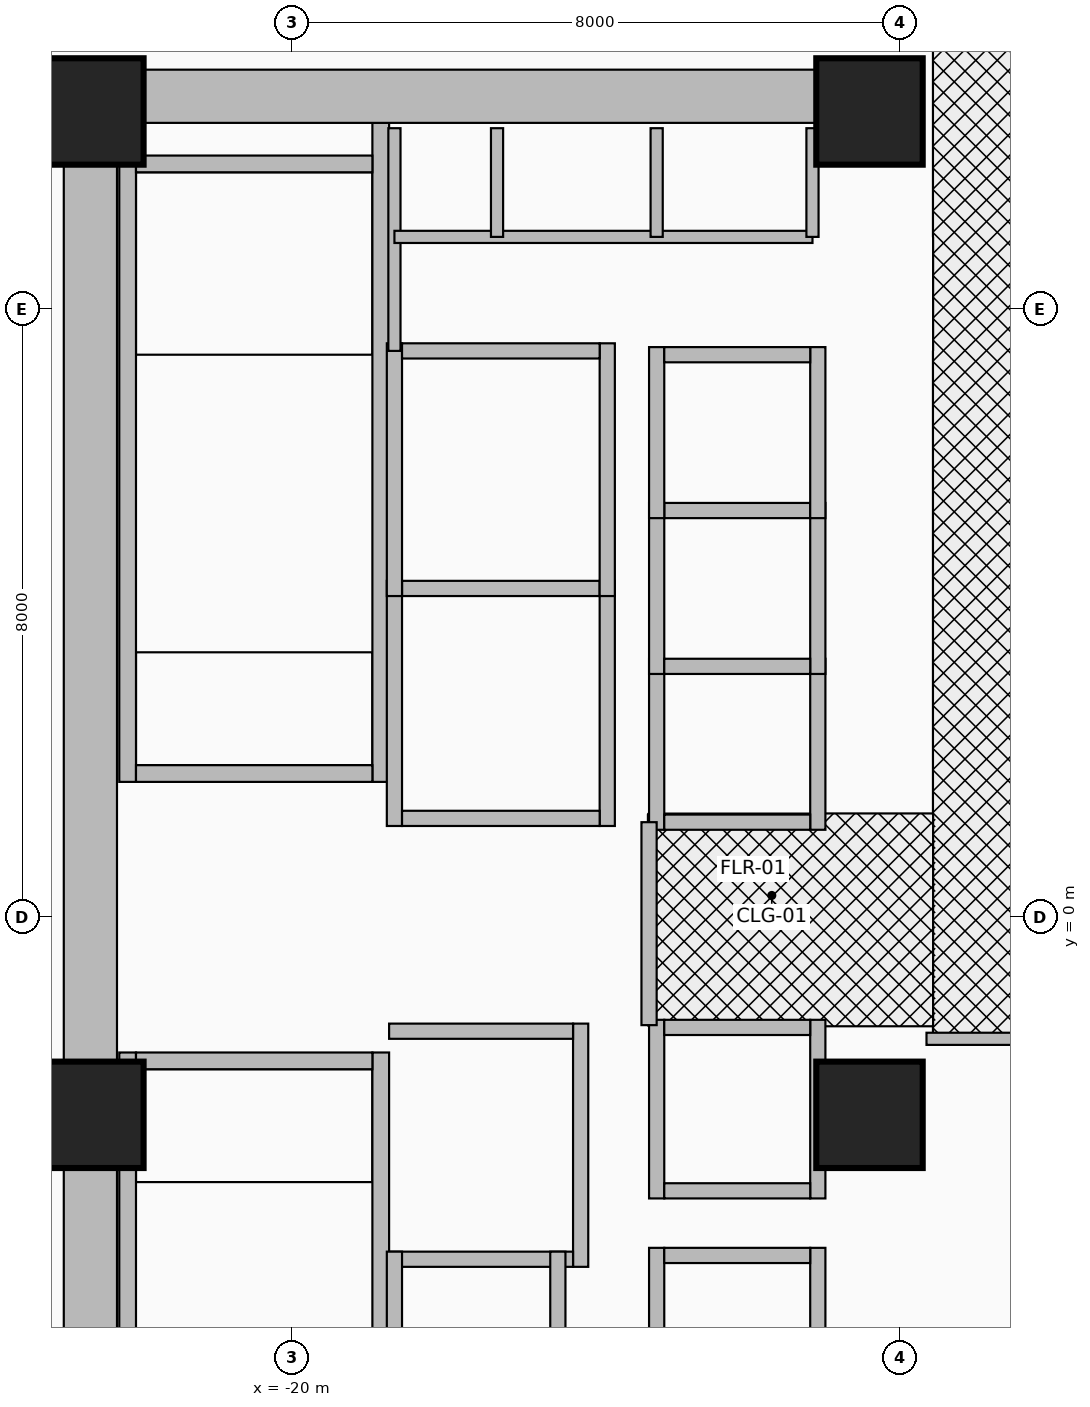
"""IFC4 building model, lengths in metres.
Left out: names, types, materials, properties, quantities, classifications, styles, units other than length and angle.
Written with IfcOpenShell. Run it as: python <this file> out.ifc"""

import sys

from ifc_helpers import new_model, si_unit, direction, frame, frame_2d, origin, origin_2d, place, context, subcontext, project, spatial, rectangle, extrude, source, transform, mapped, element, fill, save


model = new_model("IFC4")
c1 = context("Model", 3, precision=1e-05, world=origin(), true_north=direction((0.0, 1.0)))
c2 = subcontext(c1, "Body", "Model", "MODEL_VIEW")
j1 = project(units=[si_unit("LENGTHUNIT", "METRE"), si_unit("PLANEANGLEUNIT", "RADIAN")], contexts=[c1])
p1 = place(None, origin())
s1 = spatial("IfcSite", under=j1, at=p1, CompositionType="ELEMENT")
p2 = place(p1, origin())
s2 = spatial("IfcBuilding", under=s1, at=p2, CompositionType="ELEMENT")
p3 = place(p2, frame((0.0, 0.0, 5.2)))
s3 = spatial("IfcBuildingStorey", under=s2, at=p3, CompositionType="ELEMENT", Elevation=5.2)
for number, where, z_axis, x_axis in (
    (1, (-22.16, 1.78, 0.0), (0.0, 0.0, 1.0), (0.0, 1.0, 0.0)),
    (2, (-18.83, 1.78, 0.0), (0.0, 0.0, 1.0), (0.0, 1.0, 0.0)),
):
    element("IfcWall", number, at=place(p3, frame(where, z_axis=z_axis, x_axis=x_axis)), inside=s3, PredefinedType="SHEAR", context=c2, shape_type="SweptSolid", body=[
        extrude(rectangle(XDim=8.67, YDim=0.22, at=frame_2d((4.335, 0.0))), origin(), (0.0, 0.0, 1.0), 4.92),
    ])
p4 = place(p3, frame((-22.05, 1.89, 0.0), z_axis=(0.0, 0.0, 1.0), x_axis=(1.0, 0.0, 0.0)))
e3 = element("IfcWall", 3, at=p4, inside=s3, PredefinedType="SHEAR", context=c2, shape_type="SweptSolid", body=[
    extrude(rectangle(XDim=3.11, YDim=0.22, at=frame_2d((1.555, 0.0))), origin(), (0.0, 0.0, 1.0), 4.92),
])
p5 = place(p4, frame((1.0, 0.0, 0.0)))
e4 = element("IfcOpeningElement", 4, at=p5, cuts=e3, PredefinedType="OPENING", context=c2, shape_type="SweptSolid", body=[
    extrude(rectangle(XDim=1.1, YDim=2.15, at=frame_2d((0.55, 1.075))), frame((0.0, 0.125, 0.0), z_axis=(0.0, -1.0, 0.0), x_axis=(1.0, 0.0, 0.0)), (0.0, 0.0, 1.0), 0.25),
])
p6 = place(p3, frame((-22.05, 9.91, 0.0), z_axis=(0.0, 0.0, 1.0), x_axis=(1.0, 0.0, 0.0)))
e5 = element("IfcWall", 5, at=p6, inside=s3, PredefinedType="SHEAR", context=c2, shape_type="SweptSolid", body=[
    extrude(rectangle(XDim=3.11, YDim=0.22, at=frame_2d((1.555, 0.0))), origin(), (0.0, 0.0, 1.0), 4.92),
])
for number, where, z_axis, x_axis in (
    (6, (-22.16, -10.45, 0.0), (0.0, 0.0, 1.0), (0.0, 1.0, 0.0)),
    (7, (-18.83, -10.45, 0.0), (0.0, 0.0, 1.0), (0.0, 1.0, 0.0)),
):
    element("IfcWall", number, at=place(p3, frame(where, z_axis=z_axis, x_axis=x_axis)), inside=s3, PredefinedType="SHEAR", context=c2, shape_type="SweptSolid", body=[
        extrude(rectangle(XDim=8.67, YDim=0.22, at=frame_2d((4.335, 0.0))), origin(), (0.0, 0.0, 1.0), 4.92),
    ])
p7 = place(p3, frame((-22.05, -1.89, 0.0), z_axis=(0.0, 0.0, 1.0), x_axis=(1.0, 0.0, 0.0)))
e8 = element("IfcWall", 8, at=p7, inside=s3, PredefinedType="SHEAR", context=c2, shape_type="SweptSolid", body=[
    extrude(rectangle(XDim=3.11, YDim=0.22, at=frame_2d((1.555, 0.0))), origin(), (0.0, 0.0, 1.0), 4.92),
])
p8 = place(p7, frame((1.0, 0.0, 0.0)))
e9 = element("IfcOpeningElement", 9, at=p8, cuts=e8, PredefinedType="OPENING", context=c2, shape_type="SweptSolid", body=[
    extrude(rectangle(XDim=1.1, YDim=2.15, at=frame_2d((0.55, 1.075))), frame((0.0, 0.125, 0.0), z_axis=(0.0, -1.0, 0.0), x_axis=(1.0, 0.0, 0.0)), (0.0, 0.0, 1.0), 0.25),
])
p9 = place(p3, frame((-22.65, -11.15, 0.0), z_axis=(0.0, 0.0, 1.0), x_axis=(0.0, 1.0, 0.0)))
e10 = element("IfcWall", 10, at=p9, inside=s3, PredefinedType="SHEAR", context=c2, shape_type="SweptSolid", body=[
    extrude(rectangle(XDim=22.3, YDim=0.7, at=frame_2d((11.15, 0.0))), origin(), (0.0, 0.0, 1.0), 4.92),
])
p10 = place(p3, frame((-22.65, 10.8, 0.0), z_axis=(0.0, 0.0, 1.0), x_axis=(1.0, 0.0, 0.0)))
e11 = element("IfcWall", 11, at=p10, inside=s3, PredefinedType="SHEAR", context=c2, shape_type="SweptSolid", body=[
    extrude(rectangle(XDim=10.25, YDim=0.7, at=frame_2d((5.125, 0.0))), origin(), (0.0, 0.0, 1.0), 4.92),
])
m1 = source(origin(), c2, "Body", "SweptSolid", [
    extrude(rectangle(XDim=1.4, YDim=1.4, at=origin_2d()), origin(), (0.0, 0.0, 1.0), 5.2),
])
for number, where, z_axis, x_axis in (
    (12, (-22.65, -2.6, 0.0), (0.0, 0.0, 1.0), (1.0, 0.0, 0.0)),
    (13, (-12.4, -2.6, 0.0), (0.0, 0.0, 1.0), (1.0, 0.0, 0.0)),
    (14, (-22.65, 10.6, 0.0), (0.0, 0.0, 1.0), (1.0, 0.0, 0.0)),
    (15, (-12.4, 10.6, 0.0), (0.0, 0.0, 1.0), (1.0, 0.0, 0.0)),
):
    element("IfcColumn", number, at=place(p3, frame(where, z_axis=z_axis, x_axis=x_axis)), inside=s3, PredefinedType="COLUMN", context=c2, shape_type="MappedRepresentation", body=[
        mapped(m1, transform((0.0, 0.0, 0.0), x_axis=(1.0, 0.0, 0.0), y_axis=(0.0, 1.0, 0.0), z_axis=(0.0, 0.0, 1.0), scale=1.0)),
    ])
for number, where, z_axis, x_axis in (
    (16, (-18.65, 1.2, 0.0), (0.0, 0.0, 1.0), (0.0, 1.0, 0.0)),
    (17, (-15.85, 1.2, 0.0), (0.0, 0.0, 1.0), (0.0, 1.0, 0.0)),
):
    element("IfcWall", number, at=place(p3, frame(where, z_axis=z_axis, x_axis=x_axis)), inside=s3, PredefinedType="MOVABLE", context=c2, shape_type="SweptSolid", body=[
        extrude(rectangle(XDim=3.225, YDim=0.2, at=frame_2d((1.613, 0.0))), origin(), (0.0, 0.0, 1.0), 4.92),
    ])
p11 = place(p3, frame((-18.55, 1.3, 0.0), z_axis=(0.0, 0.0, 1.0), x_axis=(1.0, 0.0, 0.0)))
e18 = element("IfcWall", 18, at=p11, inside=s3, PredefinedType="MOVABLE", context=c2, shape_type="SweptSolid", body=[
    extrude(rectangle(XDim=2.6, YDim=0.2, at=frame_2d((1.3, 0.0))), origin(), (0.0, 0.0, 1.0), 4.92),
])
p12 = place(p11, frame((0.7, 0.0, 0.0)))
e19 = element("IfcOpeningElement", 19, at=p12, cuts=e18, PredefinedType="OPENING", context=c2, shape_type="SweptSolid", body=[
    extrude(rectangle(XDim=1.2, YDim=2.1, at=frame_2d((0.6, 1.05))), frame((0.0, 0.115, 0.0), z_axis=(0.0, -1.0, 0.0), x_axis=(1.0, 0.0, 0.0)), (0.0, 0.0, 1.0), 0.23),
])
p13 = place(p3, frame((-18.55, 4.325, 0.0), z_axis=(0.0, 0.0, 1.0), x_axis=(1.0, 0.0, 0.0)))
e20 = element("IfcWall", 20, at=p13, inside=s3, PredefinedType="MOVABLE", context=c2, shape_type="SweptSolid", body=[
    extrude(rectangle(XDim=2.6, YDim=0.2, at=frame_2d((1.3, 0.0))), origin(), (0.0, 0.0, 1.0), 4.92),
])
p14 = place(p3, frame((-16.2, -4.6, 0.0), z_axis=(0.0, 0.0, 1.0), x_axis=(0.0, 1.0, 0.0)))
e21 = element("IfcWall", 21, at=p14, inside=s3, PredefinedType="MOVABLE", context=c2, shape_type="SweptSolid", body=[
    extrude(rectangle(XDim=3.2, YDim=0.2, at=frame_2d((1.6, 0.0))), origin(), (0.0, 0.0, 1.0), 4.92),
])
p15 = place(p3, frame((-18.72, -4.5, 0.0), z_axis=(0.0, 0.0, 1.0), x_axis=(1.0, 0.0, 0.0)))
e22 = element("IfcWall", 22, at=p15, inside=s3, PredefinedType="MOVABLE", context=c2, shape_type="SweptSolid", body=[
    extrude(rectangle(XDim=2.42, YDim=0.2, at=frame_2d((1.21, 0.0))), origin(), (0.0, 0.0, 1.0), 4.92),
])
p16 = place(p3, frame((-18.72, -1.5, 0.0), z_axis=(0.0, 0.0, 1.0), x_axis=(1.0, 0.0, 0.0)))
e23 = element("IfcWall", 23, at=p16, inside=s3, PredefinedType="MOVABLE", context=c2, shape_type="SweptSolid", body=[
    extrude(rectangle(XDim=2.42, YDim=0.2, at=frame_2d((1.21, 0.0))), origin(), (0.0, 0.0, 1.0), 4.92),
])
p17 = place(p16, frame((0.61, 0.0, 0.0)))
e24 = element("IfcOpeningElement", 24, at=p17, cuts=e23, PredefinedType="OPENING", context=c2, shape_type="SweptSolid", body=[
    extrude(rectangle(XDim=1.2, YDim=2.1, at=frame_2d((0.6, 1.05))), frame((0.0, 0.115, 0.0), z_axis=(0.0, -1.0, 0.0), x_axis=(1.0, 0.0, 0.0)), (0.0, 0.0, 1.0), 0.23),
])
for number, where, z_axis, x_axis in (
    (25, (-18.65, 4.225, 0.0), (0.0, 0.0, 1.0), (0.0, 1.0, 0.0)),
    (26, (-15.85, 4.225, 0.0), (0.0, 0.0, 1.0), (0.0, 1.0, 0.0)),
):
    element("IfcWall", number, at=place(p3, frame(where, z_axis=z_axis, x_axis=x_axis)), inside=s3, PredefinedType="MOVABLE", context=c2, shape_type="SweptSolid", body=[
        extrude(rectangle(XDim=3.325, YDim=0.2, at=frame_2d((1.663, 0.0))), origin(), (0.0, 0.0, 1.0), 4.92),
    ])
p18 = place(p3, frame((-18.55, 7.45, 0.0), z_axis=(0.0, 0.0, 1.0), x_axis=(1.0, 0.0, 0.0)))
e27 = element("IfcWall", 27, at=p18, inside=s3, PredefinedType="MOVABLE", context=c2, shape_type="SweptSolid", body=[
    extrude(rectangle(XDim=2.6, YDim=0.2, at=frame_2d((1.3, 0.0))), origin(), (0.0, 0.0, 1.0), 4.92),
])
p19 = place(p18, frame((0.7, 0.0, 0.0)))
e28 = element("IfcOpeningElement", 28, at=p19, cuts=e27, PredefinedType="OPENING", context=c2, shape_type="SweptSolid", body=[
    extrude(rectangle(XDim=1.2, YDim=2.1, at=frame_2d((0.6, 1.05))), frame((0.0, 0.115, 0.0), z_axis=(0.0, -1.0, 0.0), x_axis=(1.0, 0.0, 0.0)), (0.0, 0.0, 1.0), 0.23),
])
for number, where, z_axis, x_axis in (
    (29, (-15.2, -6.7, 0.0), (0.0, 0.0, 1.0), (0.0, 1.0, 0.0)),
    (30, (-13.08, -6.7, 0.0), (0.0, 0.0, 1.0), (0.0, 1.0, 0.0)),
):
    element("IfcWall", number, at=place(p3, frame(where, z_axis=z_axis, x_axis=x_axis)), inside=s3, PredefinedType="MOVABLE", context=c2, shape_type="SweptSolid", body=[
        extrude(rectangle(XDim=2.35, YDim=0.2, at=frame_2d((1.175, 0.0))), origin(), (0.0, 0.0, 1.0), 4.92),
    ])
p20 = place(p3, frame((-15.1, -4.45, 0.0), z_axis=(0.0, 0.0, 1.0), x_axis=(1.0, 0.0, 0.0)))
e31 = element("IfcWall", 31, at=p20, inside=s3, PredefinedType="MOVABLE", context=c2, shape_type="SweptSolid", body=[
    extrude(rectangle(XDim=1.92, YDim=0.2, at=frame_2d((0.96, 0.0))), origin(), (0.0, 0.0, 1.0), 4.92),
])
for number, where, z_axis, x_axis in (
    (32, (-15.2, 1.15, 0.0), (0.0, 0.0, 1.0), (0.0, 1.0, 0.0)),
    (33, (-13.08, 1.15, 0.0), (0.0, 0.0, 1.0), (0.0, 1.0, 0.0)),
):
    element("IfcWall", number, at=place(p3, frame(where, z_axis=z_axis, x_axis=x_axis)), inside=s3, PredefinedType="MOVABLE", context=c2, shape_type="SweptSolid", body=[
        extrude(rectangle(XDim=2.25, YDim=0.2, at=frame_2d((1.125, 0.0))), origin(), (0.0, 0.0, 1.0), 4.92),
    ])
p21 = place(p3, frame((-15.1, 1.25, 0.0), z_axis=(0.0, 0.0, 1.0), x_axis=(1.0, 0.0, 0.0)))
e34 = element("IfcWall", 34, at=p21, inside=s3, PredefinedType="MOVABLE", context=c2, shape_type="SweptSolid", body=[
    extrude(rectangle(XDim=1.92, YDim=0.2, at=frame_2d((0.96, 0.0))), origin(), (0.0, 0.0, 1.0), 4.92),
])
for number, where, z_axis, x_axis in (
    (35, (-15.2, 3.2, 0.0), (0.0, 0.0, 1.0), (0.0, 1.0, 0.0)),
    (36, (-13.08, 3.2, 0.0), (0.0, 0.0, 1.0), (0.0, 1.0, 0.0)),
):
    element("IfcWall", number, at=place(p3, frame(where, z_axis=z_axis, x_axis=x_axis)), inside=s3, PredefinedType="MOVABLE", context=c2, shape_type="SweptSolid", body=[
        extrude(rectangle(XDim=2.25, YDim=0.2, at=frame_2d((1.125, 0.0))), origin(), (0.0, 0.0, 1.0), 4.92),
    ])
for number, where, z_axis, x_axis in (
    (37, (-15.1, 3.3, 0.0), (0.0, 0.0, 1.0), (1.0, 0.0, 0.0)),
    (38, (-15.1, 5.35, 0.0), (0.0, 0.0, 1.0), (1.0, 0.0, 0.0)),
):
    element("IfcWall", number, at=place(p3, frame(where, z_axis=z_axis, x_axis=x_axis)), inside=s3, PredefinedType="MOVABLE", context=c2, shape_type="SweptSolid", body=[
        extrude(rectangle(XDim=1.92, YDim=0.2, at=frame_2d((0.96, 0.0))), origin(), (0.0, 0.0, 1.0), 4.92),
    ])
for number, where, z_axis, x_axis in (
    (39, (-15.2, 5.25, 0.0), (0.0, 0.0, 1.0), (0.0, 1.0, 0.0)),
    (40, (-13.08, 5.25, 0.0), (0.0, 0.0, 1.0), (0.0, 1.0, 0.0)),
):
    element("IfcWall", number, at=place(p3, frame(where, z_axis=z_axis, x_axis=x_axis)), inside=s3, PredefinedType="MOVABLE", context=c2, shape_type="SweptSolid", body=[
        extrude(rectangle(XDim=2.25, YDim=0.2, at=frame_2d((1.125, 0.0))), origin(), (0.0, 0.0, 1.0), 4.92),
    ])
p22 = place(p3, frame((-15.1, 7.4, 0.0), z_axis=(0.0, 0.0, 1.0), x_axis=(1.0, 0.0, 0.0)))
e41 = element("IfcWall", 41, at=p22, inside=s3, PredefinedType="MOVABLE", context=c2, shape_type="SweptSolid", body=[
    extrude(rectangle(XDim=1.92, YDim=0.2, at=frame_2d((0.96, 0.0))), origin(), (0.0, 0.0, 1.0), 4.92),
])
for number, where, z_axis, x_axis in (
    (42, (-18.65, -6.7, 0.0), (0.0, 0.0, 1.0), (0.0, 1.0, 0.0)),
    (43, (-16.5, -6.7, 0.0), (0.0, 0.0, 1.0), (0.0, 1.0, 0.0)),
):
    element("IfcWall", number, at=place(p3, frame(where, z_axis=z_axis, x_axis=x_axis)), inside=s3, PredefinedType="MOVABLE", context=c2, shape_type="SweptSolid", body=[
        extrude(rectangle(XDim=2.3, YDim=0.2, at=frame_2d((1.15, 0.0))), origin(), (0.0, 0.0, 1.0), 4.92),
    ])
for number, where, z_axis, x_axis in (
    (44, (-15.2, -3.7, 0.0), (0.0, 0.0, 1.0), (0.0, 1.0, 0.0)),
    (45, (-13.08, -3.7, 0.0), (0.0, 0.0, 1.0), (0.0, 1.0, 0.0)),
):
    element("IfcWall", number, at=place(p3, frame(where, z_axis=z_axis, x_axis=x_axis)), inside=s3, PredefinedType="MOVABLE", context=c2, shape_type="SweptSolid", body=[
        extrude(rectangle(XDim=2.35, YDim=0.2, at=frame_2d((1.175, 0.0))), origin(), (0.0, 0.0, 1.0), 4.92),
    ])
for number, where, z_axis, x_axis in (
    (46, (-15.1, -3.6, 0.0), (0.0, 0.0, 1.0), (1.0, 0.0, 0.0)),
    (47, (-15.1, -1.45, 0.0), (0.0, 0.0, 1.0), (1.0, 0.0, 0.0)),
):
    element("IfcWall", number, at=place(p3, frame(where, z_axis=z_axis, x_axis=x_axis)), inside=s3, PredefinedType="MOVABLE", context=c2, shape_type="SweptSolid", body=[
        extrude(rectangle(XDim=1.92, YDim=0.2, at=frame_2d((0.96, 0.0))), origin(), (0.0, 0.0, 1.0), 4.92),
    ])
p23 = place(p3, frame((-15.3, -1.42, 0.0), z_axis=(0.0, 0.0, 1.0), x_axis=(0.0, 1.0, 0.0)))
e48 = element("IfcWall", 48, at=p23, inside=s3, PredefinedType="PARTITIONING", context=c2, shape_type="SweptSolid", body=[
    extrude(rectangle(XDim=2.67, YDim=0.2, at=frame_2d((1.335, 0.0))), origin(), (0.0, 0.0, 1.0), 4.92),
])
p24 = place(p23, frame((0.78, 0.0, 0.0)))
e49 = element("IfcOpeningElement", 49, at=p24, cuts=e48, PredefinedType="OPENING", context=c2, shape_type="SweptSolid", body=[
    extrude(rectangle(XDim=1.05, YDim=2.15, at=frame_2d((0.525, 1.075))), frame((0.0, 0.115, 0.0), z_axis=(0.0, -1.0, 0.0), x_axis=(1.0, 0.0, 0.0)), (0.0, 0.0, 1.0), 0.23),
])
p25 = place(p3, frame((-18.65, 7.45, 0.0), z_axis=(0.0, 0.0, 1.0), x_axis=(0.0, 1.0, 0.0)))
e50 = element("IfcWall", 50, at=p25, inside=s3, PredefinedType="PARTITIONING", context=c2, shape_type="SweptSolid", body=[
    extrude(rectangle(XDim=2.93, YDim=0.16, at=frame_2d((1.465, 0.0))), origin(), (0.0, 0.0, 1.0), 3.957),
])
p26 = place(p3, frame((-18.65, 8.95, 0.0), z_axis=(0.0, 0.0, 1.0), x_axis=(1.0, 0.0, 0.0)))
e51 = element("IfcWall", 51, at=p26, inside=s3, PredefinedType="PARTITIONING", context=c2, shape_type="SweptSolid", body=[
    extrude(rectangle(XDim=5.5, YDim=0.16, at=frame_2d((2.75, 0.0))), origin(), (0.0, 0.0, 1.0), 4.92),
])
p27 = place(p26, frame((0.3, 0.0, 0.0)))
e52 = element("IfcOpeningElement", 52, at=p27, cuts=e51, PredefinedType="OPENING", context=c2, shape_type="SweptSolid", body=[
    extrude(rectangle(XDim=0.85, YDim=2.05, at=frame_2d((0.425, 1.025))), frame((0.0, 0.095, 0.0), z_axis=(0.0, -1.0, 0.0), x_axis=(1.0, 0.0, 0.0)), (0.0, 0.0, 1.0), 0.19),
])
p28 = place(p26, frame((1.85, 0.0, 0.0)))
e53 = element("IfcOpeningElement", 53, at=p28, cuts=e51, PredefinedType="OPENING", context=c2, shape_type="SweptSolid", body=[
    extrude(rectangle(XDim=0.85, YDim=2.05, at=frame_2d((0.425, 1.025))), frame((0.0, 0.095, 0.0), z_axis=(0.0, -1.0, 0.0), x_axis=(1.0, 0.0, 0.0)), (0.0, 0.0, 1.0), 0.19),
])
p29 = place(p26, frame((3.9, 0.0, 0.0)))
e54 = element("IfcOpeningElement", 54, at=p29, cuts=e51, PredefinedType="OPENING", context=c2, shape_type="SweptSolid", body=[
    extrude(rectangle(XDim=0.85, YDim=2.05, at=frame_2d((0.425, 1.025))), frame((0.0, 0.095, 0.0), z_axis=(0.0, -1.0, 0.0), x_axis=(1.0, 0.0, 0.0)), (0.0, 0.0, 1.0), 0.19),
])
for number, where, z_axis, x_axis in (
    (55, (-13.15, 8.95, 0.0), (0.0, 0.0, 1.0), (0.0, 1.0, 0.0)),
    (56, (-17.3, 8.95, 0.0), (0.0, 0.0, 1.0), (0.0, 1.0, 0.0)),
    (57, (-15.2, 8.95, 0.0), (0.0, 0.0, 1.0), (0.0, 1.0, 0.0)),
):
    element("IfcWall", number, at=place(p3, frame(where, z_axis=z_axis, x_axis=x_axis)), inside=s3, PredefinedType="PARTITIONING", context=c2, shape_type="SweptSolid", body=[
        extrude(rectangle(XDim=1.43, YDim=0.16, at=frame_2d((0.715, 0.0))), origin(), (0.0, 0.0, 1.0), 3.957),
    ])
p30 = place(p3, frame((-11.65, -1.6, 0.0), z_axis=(0.0, 0.0, 1.0), x_axis=(1.0, 0.0, 0.0)))
e58 = element("IfcWall", 58, at=p30, inside=s3, PredefinedType="PARTITIONING", context=c2, shape_type="SweptSolid", body=[
    extrude(rectangle(XDim=1.85, YDim=0.16, at=frame_2d((0.925, 0.0))), origin(), (0.0, 0.0, 1.0), 4.92),
])
p31 = place(p12, origin())
e59 = element("IfcDoor", 59, at=p31, inside=s3, OperationType="DOUBLE_DOOR_SLIDING", PredefinedType="DOOR", context=c2, shape_type="SweptSolid", body=[
    extrude(rectangle(XDim=1.2, YDim=2.1, at=frame_2d((0.6, 1.05))), frame((0.0, 0.025, 0.0), z_axis=(0.0, -1.0, 0.0), x_axis=(1.0, 0.0, 0.0)), (0.0, 0.0, 1.0), 0.05),
])
fill(e19, e59)
p32 = place(p17, origin())
e60 = element("IfcDoor", 60, at=p32, inside=s3, OperationType="DOUBLE_DOOR_SLIDING", PredefinedType="DOOR", context=c2, shape_type="SweptSolid", body=[
    extrude(rectangle(XDim=1.2, YDim=2.1, at=frame_2d((0.6, 1.05))), frame((0.0, 0.025, 0.0), z_axis=(0.0, -1.0, 0.0), x_axis=(1.0, 0.0, 0.0)), (0.0, 0.0, 1.0), 0.05),
])
fill(e24, e60)
p33 = place(p19, origin())
e61 = element("IfcDoor", 61, at=p33, inside=s3, OperationType="DOUBLE_DOOR_SLIDING", PredefinedType="DOOR", context=c2, shape_type="SweptSolid", body=[
    extrude(rectangle(XDim=1.2, YDim=2.1, at=frame_2d((0.6, 1.05))), frame((0.0, 0.025, 0.0), z_axis=(0.0, -1.0, 0.0), x_axis=(1.0, 0.0, 0.0)), (0.0, 0.0, 1.0), 0.05),
])
fill(e28, e61)
p34 = place(p24, origin())
e62 = element("IfcDoor", 62, at=p34, inside=s3, OperationType="SINGLE_SWING_RIGHT", PredefinedType="DOOR", context=c2, shape_type="SweptSolid", body=[
    extrude(rectangle(XDim=1.05, YDim=2.15, at=frame_2d((0.525, 1.075))), frame((0.0, 0.025, 0.0), z_axis=(0.0, -1.0, 0.0), x_axis=(1.0, 0.0, 0.0)), (0.0, 0.0, 1.0), 0.05),
])
fill(e49, e62)
p35 = place(p5, frame((1.1, 0.0, 0.0), z_axis=(0.0, 0.0, 1.0), x_axis=(-1.0, 0.0, 0.0)))
e63 = element("IfcDoor", 63, at=p35, inside=s3, OperationType="SINGLE_SWING_LEFT", PredefinedType="DOOR", context=c2, shape_type="SweptSolid", body=[
    extrude(rectangle(XDim=1.1, YDim=2.15, at=frame_2d((0.55, 1.075))), frame((0.0, 0.025, 0.0), z_axis=(0.0, -1.0, 0.0), x_axis=(1.0, 0.0, 0.0)), (0.0, 0.0, 1.0), 0.05),
])
fill(e4, e63)
p36 = place(p8, origin())
e64 = element("IfcDoor", 64, at=p36, inside=s3, OperationType="SINGLE_SWING_RIGHT", PredefinedType="DOOR", context=c2, shape_type="SweptSolid", body=[
    extrude(rectangle(XDim=1.1, YDim=2.15, at=frame_2d((0.55, 1.075))), frame((0.0, 0.025, 0.0), z_axis=(0.0, -1.0, 0.0), x_axis=(1.0, 0.0, 0.0)), (0.0, 0.0, 1.0), 0.05),
])
fill(e9, e64)
p37 = place(p27, origin())
e65 = element("IfcDoor", 65, at=p37, inside=s3, OperationType="SINGLE_SWING_LEFT", PredefinedType="DOOR", context=c2, shape_type="SweptSolid", body=[
    extrude(rectangle(XDim=0.85, YDim=2.05, at=frame_2d((0.425, 1.025))), frame((0.0, 0.025, 0.0), z_axis=(0.0, -1.0, 0.0), x_axis=(1.0, 0.0, 0.0)), (0.0, 0.0, 1.0), 0.05),
])
fill(e52, e65)
p38 = place(p28, origin())
e66 = element("IfcDoor", 66, at=p38, inside=s3, OperationType="SINGLE_SWING_RIGHT", PredefinedType="DOOR", context=c2, shape_type="SweptSolid", body=[
    extrude(rectangle(XDim=0.85, YDim=2.05, at=frame_2d((0.425, 1.025))), frame((0.0, 0.025, 0.0), z_axis=(0.0, -1.0, 0.0), x_axis=(1.0, 0.0, 0.0)), (0.0, 0.0, 1.0), 0.05),
])
fill(e53, e66)
p39 = place(p29, origin())
e67 = element("IfcDoor", 67, at=p39, inside=s3, OperationType="SINGLE_SWING_LEFT", PredefinedType="DOOR", context=c2, shape_type="SweptSolid", body=[
    extrude(rectangle(XDim=0.85, YDim=2.05, at=frame_2d((0.425, 1.025))), frame((0.0, 0.025, 0.0), z_axis=(0.0, -1.0, 0.0), x_axis=(1.0, 0.0, 0.0)), (0.0, 0.0, 1.0), 0.05),
])
fill(e54, e67)
save(model, sys.argv[1])
